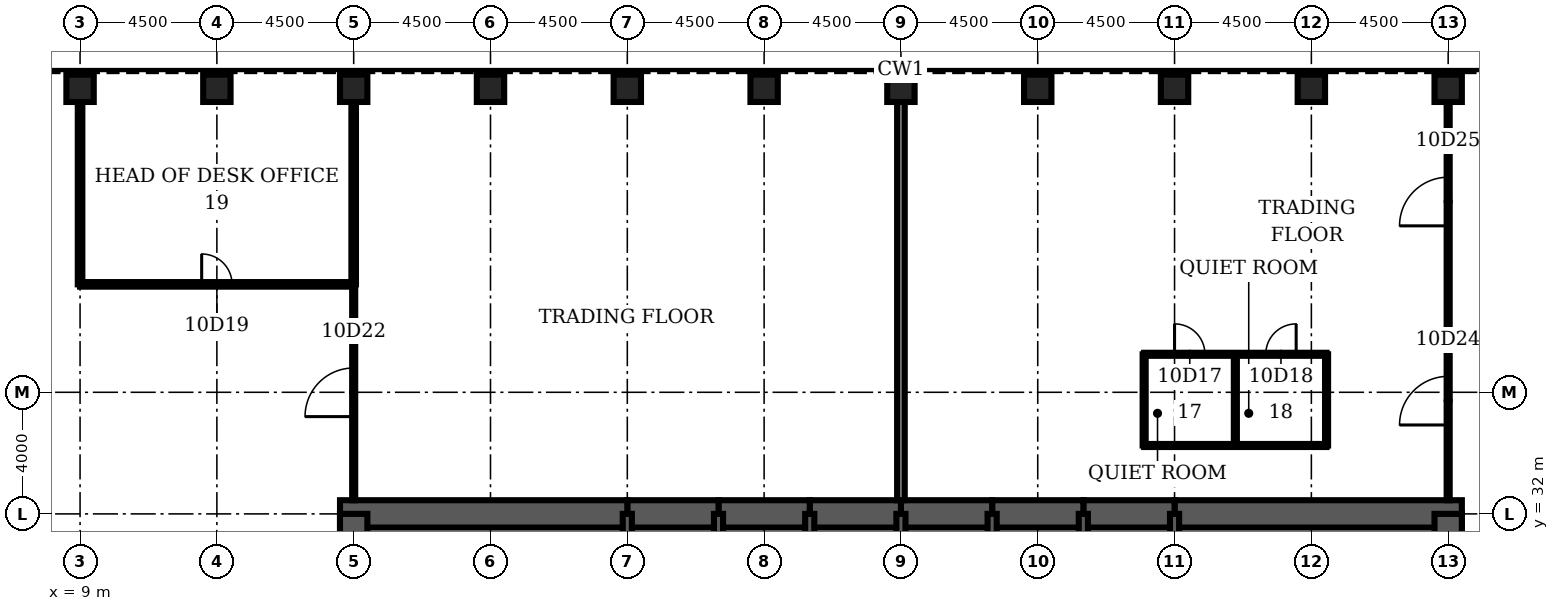
"""IFC4 building model, lengths in metres.
Left out: names, types, materials, properties, quantities, classifications, styles, units other than length and angle.
Written with IfcOpenShell. Run it as: python <this file> out.ifc"""

import sys

from ifc_helpers import new_model, si_unit, direction, frame, frame_2d, origin, origin_2d, place, context, subcontext, project, spatial, rectangle, hollow_rectangle, extrude, element, fill, save


model = new_model("IFC4")
c1 = context("Model", 3, precision=1e-05, world=origin(), true_north=direction((0.0, 1.0)))
c2 = subcontext(c1, "Body", "Model", "MODEL_VIEW")
j1 = project(units=[si_unit("LENGTHUNIT", "METRE"), si_unit("PLANEANGLEUNIT", "RADIAN")], contexts=[c1])
p1 = place(None, origin())
s1 = spatial("IfcSite", under=j1, at=p1, CompositionType="ELEMENT")
p2 = place(p1, origin())
s2 = spatial("IfcBuilding", under=s1, at=p2, CompositionType="ELEMENT")
p3 = place(p2, frame((0.0, 0.0, 50.0)))
s3 = spatial("IfcBuildingStorey", under=s2, at=p3, CompositionType="ELEMENT", Elevation=50.0)
for number, where, z_axis, x_axis in (
    (1, (54.0, 46.0, 0.0), (0.0, 0.0, 1.0), (0.0, 1.0, 0.0)),
    (2, (49.5, 46.0, 0.0), (0.0, 0.0, 1.0), (0.0, 1.0, 0.0)),
    (3, (45.0, 46.0, 0.0), (0.0, 0.0, 1.0), (0.0, 1.0, 0.0)),
    (4, (40.5, 46.0, 0.0), (0.0, 0.0, 1.0), (0.0, 1.0, 0.0)),
    (5, (36.0, 46.0, 0.0), (0.0, 0.0, 1.0), (0.0, 1.0, 0.0)),
    (6, (31.5, 46.0, 0.0), (0.0, 0.0, 1.0), (0.0, 1.0, 0.0)),
    (7, (27.0, 46.0, 0.0), (0.0, 0.0, 1.0), (0.0, 1.0, 0.0)),
    (8, (22.5, 46.0, 0.0), (0.0, 0.0, 1.0), (0.0, 1.0, 0.0)),
    (9, (18.0, 46.0, 0.0), (0.0, 0.0, 1.0), (0.0, 1.0, 0.0)),
    (10, (13.5, 46.0, 0.0), (0.0, 0.0, 1.0), (0.0, 1.0, 0.0)),
    (11, (9.0, 46.0, 0.0), (0.0, 0.0, 1.0), (0.0, 1.0, 0.0)),
):
    element("IfcColumn", number, at=place(p3, frame(where, z_axis=z_axis, x_axis=x_axis)), inside=s3, PredefinedType="COLUMN", context=c2, shape_type="SweptSolid", body=[
        extrude(hollow_rectangle(XDim=0.9, YDim=0.9, WallThickness=0.12, at=origin_2d()), origin(), (0.0, 0.0, 1.0), 4.5),
    ])
p4 = place(p3, frame((54.45, 32.0, 0.0), z_axis=(0.0, 0.0, 1.0), x_axis=(-1.0, 0.0, 0.0)))
e12 = element("IfcWall", 12, at=p4, inside=s3, PredefinedType="SHEAR", context=c2, shape_type="SweptSolid", body=[
    extrude(rectangle(XDim=9.45, YDim=0.9, at=frame_2d((4.725, 0.0))), origin(), (0.0, 0.0, 1.0), 4.5),
])
for number, where, z_axis, x_axis in (
    (13, (45.0, 32.0, 0.0), (0.0, 0.0, 1.0), (-1.0, 0.0, 0.0)),
    (14, (42.0, 32.0, 0.0), (0.0, 0.0, 1.0), (-1.0, 0.0, 0.0)),
    (15, (39.0, 32.0, 0.0), (0.0, 0.0, 1.0), (-1.0, 0.0, 0.0)),
    (16, (36.0, 32.0, 0.0), (0.0, 0.0, 1.0), (-1.0, 0.0, 0.0)),
    (17, (33.0, 32.0, 0.0), (0.0, 0.0, 1.0), (-1.0, 0.0, 0.0)),
    (18, (30.0, 32.0, 0.0), (0.0, 0.0, 1.0), (-1.0, 0.0, 0.0)),
):
    element("IfcWall", number, at=place(p3, frame(where, z_axis=z_axis, x_axis=x_axis)), inside=s3, PredefinedType="SHEAR", context=c2, shape_type="SweptSolid", body=[
        extrude(rectangle(XDim=3.0, YDim=0.9, at=frame_2d((1.5, 0.0))), origin(), (0.0, 0.0, 1.0), 4.5),
    ])
p5 = place(p3, frame((27.0, 32.0, 0.0), z_axis=(0.0, 0.0, 1.0), x_axis=(-1.0, 0.0, 0.0)))
e19 = element("IfcWall", 19, at=p5, inside=s3, PredefinedType="SHEAR", context=c2, shape_type="SweptSolid", body=[
    extrude(rectangle(XDim=9.45, YDim=0.9, at=frame_2d((4.725, 0.0))), origin(), (0.0, 0.0, 1.0), 4.5),
])
for number, where, z_axis, x_axis in (
    (20, (18.0, 32.0, 0.0), (0.0, 0.0, 1.0), (0.0, -1.0, 0.0)),
    (21, (54.0, 28.8, 0.0), (0.0, 0.0, 1.0), (0.0, 1.0, 0.0)),
):
    element("IfcWall", number, at=place(p3, frame(where, z_axis=z_axis, x_axis=x_axis)), inside=s3, PredefinedType="SHEAR", context=c2, shape_type="SweptSolid", body=[
        extrude(rectangle(XDim=3.2, YDim=0.9, at=frame_2d((1.6, 0.0))), origin(), (0.0, 0.0, 1.0), 4.5),
    ])
for number, where, z_axis, x_axis in (
    (22, (27.0, 28.8, 0.0), (0.0, 0.0, 1.0), (0.0, 1.0, 0.0)),
    (23, (30.0, 28.8, 0.0), (0.0, 0.0, 1.0), (0.0, 1.0, 0.0)),
    (24, (33.0, 28.8, 0.0), (0.0, 0.0, 1.0), (0.0, 1.0, 0.0)),
    (25, (36.0, 28.8, 0.0), (0.0, 0.0, 1.0), (0.0, 1.0, 0.0)),
    (26, (39.0, 28.8, 0.0), (0.0, 0.0, 1.0), (0.0, 1.0, 0.0)),
    (27, (42.0, 28.8, 0.0), (0.0, 0.0, 1.0), (0.0, 1.0, 0.0)),
    (28, (45.0, 28.8, 0.0), (0.0, 0.0, 1.0), (0.0, 1.0, 0.0)),
):
    element("IfcWall", number, at=place(p3, frame(where, z_axis=z_axis, x_axis=x_axis)), inside=s3, PredefinedType="SOLIDWALL", context=c2, shape_type="SweptSolid", body=[
        extrude(rectangle(XDim=3.2, YDim=0.3, at=frame_2d((1.6, 0.0))), origin(), (0.0, 0.0, 1.0), 4.5),
    ])
p6 = place(p3, frame((44.0, 34.25, 0.0), z_axis=(0.0, 0.0, 1.0), x_axis=(1.0, 0.0, 0.0)))
e29 = element("IfcWall", 29, at=p6, inside=s3, PredefinedType="PARTITIONING", context=c2, shape_type="SweptSolid", body=[
    extrude(rectangle(XDim=6.0, YDim=0.1, at=frame_2d((3.0, 0.0))), origin(), (0.0, 0.0, 1.0), 3.0),
])
p7 = place(p3, frame((44.0, 37.25, 0.0), z_axis=(0.0, 0.0, 1.0), x_axis=(1.0, 0.0, 0.0)))
e30 = element("IfcWall", 30, at=p7, inside=s3, PredefinedType="PARTITIONING", context=c2, shape_type="SweptSolid", body=[
    extrude(rectangle(XDim=6.0, YDim=0.1, at=frame_2d((3.0, 0.0))), origin(), (0.0, 0.0, 1.0), 3.0),
])
p8 = place(p7, frame((1.0, 0.0, 0.0)))
e31 = element("IfcOpeningElement", 31, at=p8, cuts=e30, PredefinedType="OPENING", context=c2, shape_type="SweptSolid", body=[
    extrude(rectangle(XDim=1.0, YDim=2.1, at=frame_2d((0.5, 1.05))), frame((0.0, 0.06, 0.0), z_axis=(0.0, -1.0, 0.0), x_axis=(1.0, 0.0, 0.0)), (0.0, 0.0, 1.0), 0.12),
])
p9 = place(p7, frame((4.0, 0.0, 0.0)))
e32 = element("IfcOpeningElement", 32, at=p9, cuts=e30, PredefinedType="OPENING", context=c2, shape_type="SweptSolid", body=[
    extrude(rectangle(XDim=1.0, YDim=2.1, at=frame_2d((0.5, 1.05))), frame((0.0, 0.06, 0.0), z_axis=(0.0, -1.0, 0.0), x_axis=(1.0, 0.0, 0.0)), (0.0, 0.0, 1.0), 0.12),
])
p10 = place(p3, frame((9.0, 39.55, 0.0), z_axis=(0.0, 0.0, 1.0), x_axis=(1.0, 0.0, 0.0)))
e33 = element("IfcWall", 33, at=p10, inside=s3, PredefinedType="PARTITIONING", context=c2, shape_type="SweptSolid", body=[
    extrude(rectangle(XDim=9.0, YDim=0.15, at=frame_2d((4.5, 0.0))), origin(), (0.0, 0.0, 1.0), 3.0),
])
p11 = place(p10, frame((4.0, 0.0, 0.0)))
e34 = element("IfcOpeningElement", 34, at=p11, cuts=e33, PredefinedType="OPENING", context=c2, shape_type="SweptSolid", body=[
    extrude(rectangle(XDim=1.0, YDim=2.1, at=frame_2d((0.5, 1.05))), frame((0.0, 0.085, 0.0), z_axis=(0.0, -1.0, 0.0), x_axis=(1.0, 0.0, 0.0)), (0.0, 0.0, 1.0), 0.17),
])
p12 = place(p3, frame((9.0, 39.55, 0.0), z_axis=(0.0, 0.0, 1.0), x_axis=(0.0, 1.0, 0.0)))
e35 = element("IfcWall", 35, at=p12, inside=s3, PredefinedType="PARTITIONING", context=c2, shape_type="SweptSolid", body=[
    extrude(rectangle(XDim=6.0, YDim=0.15, at=frame_2d((3.0, 0.0))), origin(), (0.0, 0.0, 1.0), 3.0),
])
p13 = place(p3, frame((18.0, 32.45, 0.0), z_axis=(0.0, 0.0, 1.0), x_axis=(0.0, 1.0, 0.0)))
e36 = element("IfcWall", 36, at=p13, inside=s3, PredefinedType="PARTITIONING", context=c2, shape_type="SweptSolid", body=[
    extrude(rectangle(XDim=7.1, YDim=0.1, at=frame_2d((3.55, 0.0))), origin(), (0.0, 0.0, 1.0), 3.0),
])
p14 = place(p13, frame((2.75, 0.0, 0.0)))
e37 = element("IfcOpeningElement", 37, at=p14, cuts=e36, PredefinedType="OPENING", context=c2, shape_type="SweptSolid", body=[
    extrude(rectangle(XDim=1.6, YDim=2.1, at=frame_2d((0.8, 1.05))), frame((0.0, 0.06, 0.0), z_axis=(0.0, -1.0, 0.0), x_axis=(1.0, 0.0, 0.0)), (0.0, 0.0, 1.0), 0.12),
])
p15 = place(p3, frame((18.0, 39.55, 0.0), z_axis=(0.0, 0.0, 1.0), x_axis=(0.0, 1.0, 0.0)))
e38 = element("IfcWall", 38, at=p15, inside=s3, PredefinedType="PARTITIONING", context=c2, shape_type="SweptSolid", body=[
    extrude(rectangle(XDim=6.0, YDim=0.15, at=frame_2d((3.0, 0.0))), origin(), (0.0, 0.0, 1.0), 3.0),
])
p16 = place(p3, frame((36.0, 32.45, 0.0), z_axis=(0.0, 0.0, 1.0), x_axis=(0.0, 1.0, 0.0)))
e39 = element("IfcWall", 39, at=p16, inside=s3, PredefinedType="PARTITIONING", context=c2, shape_type="SweptSolid", body=[
    extrude(rectangle(XDim=13.1, YDim=0.25, at=frame_2d((6.55, 0.0))), origin(), (0.0, 0.0, 1.0), 3.0),
])
for number, where, z_axis, x_axis in (
    (40, (44.0, 34.25, 0.0), (0.0, 0.0, 1.0), (0.0, 1.0, 0.0)),
    (41, (47.0, 34.25, 0.0), (0.0, 0.0, 1.0), (0.0, 1.0, 0.0)),
    (42, (50.0, 34.25, 0.0), (0.0, 0.0, 1.0), (0.0, 1.0, 0.0)),
):
    element("IfcWall", number, at=place(p3, frame(where, z_axis=z_axis, x_axis=x_axis)), inside=s3, PredefinedType="PARTITIONING", context=c2, shape_type="SweptSolid", body=[
        extrude(rectangle(XDim=3.0, YDim=0.1, at=frame_2d((1.5, 0.0))), origin(), (0.0, 0.0, 1.0), 3.0),
    ])
p17 = place(p3, frame((54.0, 32.45, 0.0), z_axis=(0.0, 0.0, 1.0), x_axis=(0.0, 1.0, 0.0)))
e43 = element("IfcWall", 43, at=p17, inside=s3, PredefinedType="PARTITIONING", context=c2, shape_type="SweptSolid", body=[
    extrude(rectangle(XDim=13.1, YDim=0.1, at=frame_2d((6.55, 0.0))), origin(), (0.0, 0.0, 1.0), 3.0),
])
p18 = place(p17, frame((2.475, 0.0, 0.0)))
e44 = element("IfcOpeningElement", 44, at=p18, cuts=e43, PredefinedType="OPENING", context=c2, shape_type="SweptSolid", body=[
    extrude(rectangle(XDim=1.6, YDim=2.1, at=frame_2d((0.8, 1.05))), frame((0.0, 0.06, 0.0), z_axis=(0.0, -1.0, 0.0), x_axis=(1.0, 0.0, 0.0)), (0.0, 0.0, 1.0), 0.12),
])
p19 = place(p17, frame((9.025, 0.0, 0.0)))
e45 = element("IfcOpeningElement", 45, at=p19, cuts=e43, PredefinedType="OPENING", context=c2, shape_type="SweptSolid", body=[
    extrude(rectangle(XDim=1.6, YDim=2.1, at=frame_2d((0.8, 1.05))), frame((0.0, 0.06, 0.0), z_axis=(0.0, -1.0, 0.0), x_axis=(1.0, 0.0, 0.0)), (0.0, 0.0, 1.0), 0.12),
])
p20 = place(p8, origin())
e46 = element("IfcDoor", 46, at=p20, inside=s3, OperationType="SINGLE_SWING_LEFT", PredefinedType="DOOR", context=c2, shape_type="SweptSolid", body=[
    extrude(rectangle(XDim=1.0, YDim=2.1, at=frame_2d((0.5, 1.05))), frame((0.0, 0.025, 0.0), z_axis=(0.0, -1.0, 0.0), x_axis=(1.0, 0.0, 0.0)), (0.0, 0.0, 1.0), 0.05),
])
fill(e31, e46)
p21 = place(p9, origin())
e47 = element("IfcDoor", 47, at=p21, inside=s3, OperationType="SINGLE_SWING_RIGHT", PredefinedType="DOOR", context=c2, shape_type="SweptSolid", body=[
    extrude(rectangle(XDim=1.0, YDim=2.1, at=frame_2d((0.5, 1.05))), frame((0.0, 0.025, 0.0), z_axis=(0.0, -1.0, 0.0), x_axis=(1.0, 0.0, 0.0)), (0.0, 0.0, 1.0), 0.05),
])
fill(e32, e47)
p22 = place(p11, origin())
e48 = element("IfcDoor", 48, at=p22, inside=s3, OperationType="SINGLE_SWING_LEFT", PredefinedType="DOOR", context=c2, shape_type="SweptSolid", body=[
    extrude(rectangle(XDim=1.0, YDim=2.1, at=frame_2d((0.5, 1.05))), frame((0.0, 0.025, 0.0), z_axis=(0.0, -1.0, 0.0), x_axis=(1.0, 0.0, 0.0)), (0.0, 0.0, 1.0), 0.05),
])
fill(e34, e48)
p23 = place(p14, origin())
e49 = element("IfcDoor", 49, at=p23, inside=s3, OperationType="SINGLE_SWING_LEFT", PredefinedType="DOOR", context=c2, shape_type="SweptSolid", body=[
    extrude(rectangle(XDim=1.6, YDim=2.1, at=frame_2d((0.8, 1.05))), frame((0.0, 0.025, 0.0), z_axis=(0.0, -1.0, 0.0), x_axis=(1.0, 0.0, 0.0)), (0.0, 0.0, 1.0), 0.05),
])
fill(e37, e49)
p24 = place(p18, origin())
e50 = element("IfcDoor", 50, at=p24, inside=s3, OperationType="SINGLE_SWING_LEFT", PredefinedType="DOOR", context=c2, shape_type="SweptSolid", body=[
    extrude(rectangle(XDim=1.6, YDim=2.1, at=frame_2d((0.8, 1.05))), frame((0.0, 0.025, 0.0), z_axis=(0.0, -1.0, 0.0), x_axis=(1.0, 0.0, 0.0)), (0.0, 0.0, 1.0), 0.05),
])
fill(e44, e50)
p25 = place(p19, origin())
e51 = element("IfcDoor", 51, at=p25, inside=s3, OperationType="SINGLE_SWING_LEFT", PredefinedType="DOOR", context=c2, shape_type="SweptSolid", body=[
    extrude(rectangle(XDim=1.6, YDim=2.1, at=frame_2d((0.8, 1.05))), frame((0.0, 0.025, 0.0), z_axis=(0.0, -1.0, 0.0), x_axis=(1.0, 0.0, 0.0)), (0.0, 0.0, 1.0), 0.05),
])
fill(e45, e51)
save(model, sys.argv[1])
